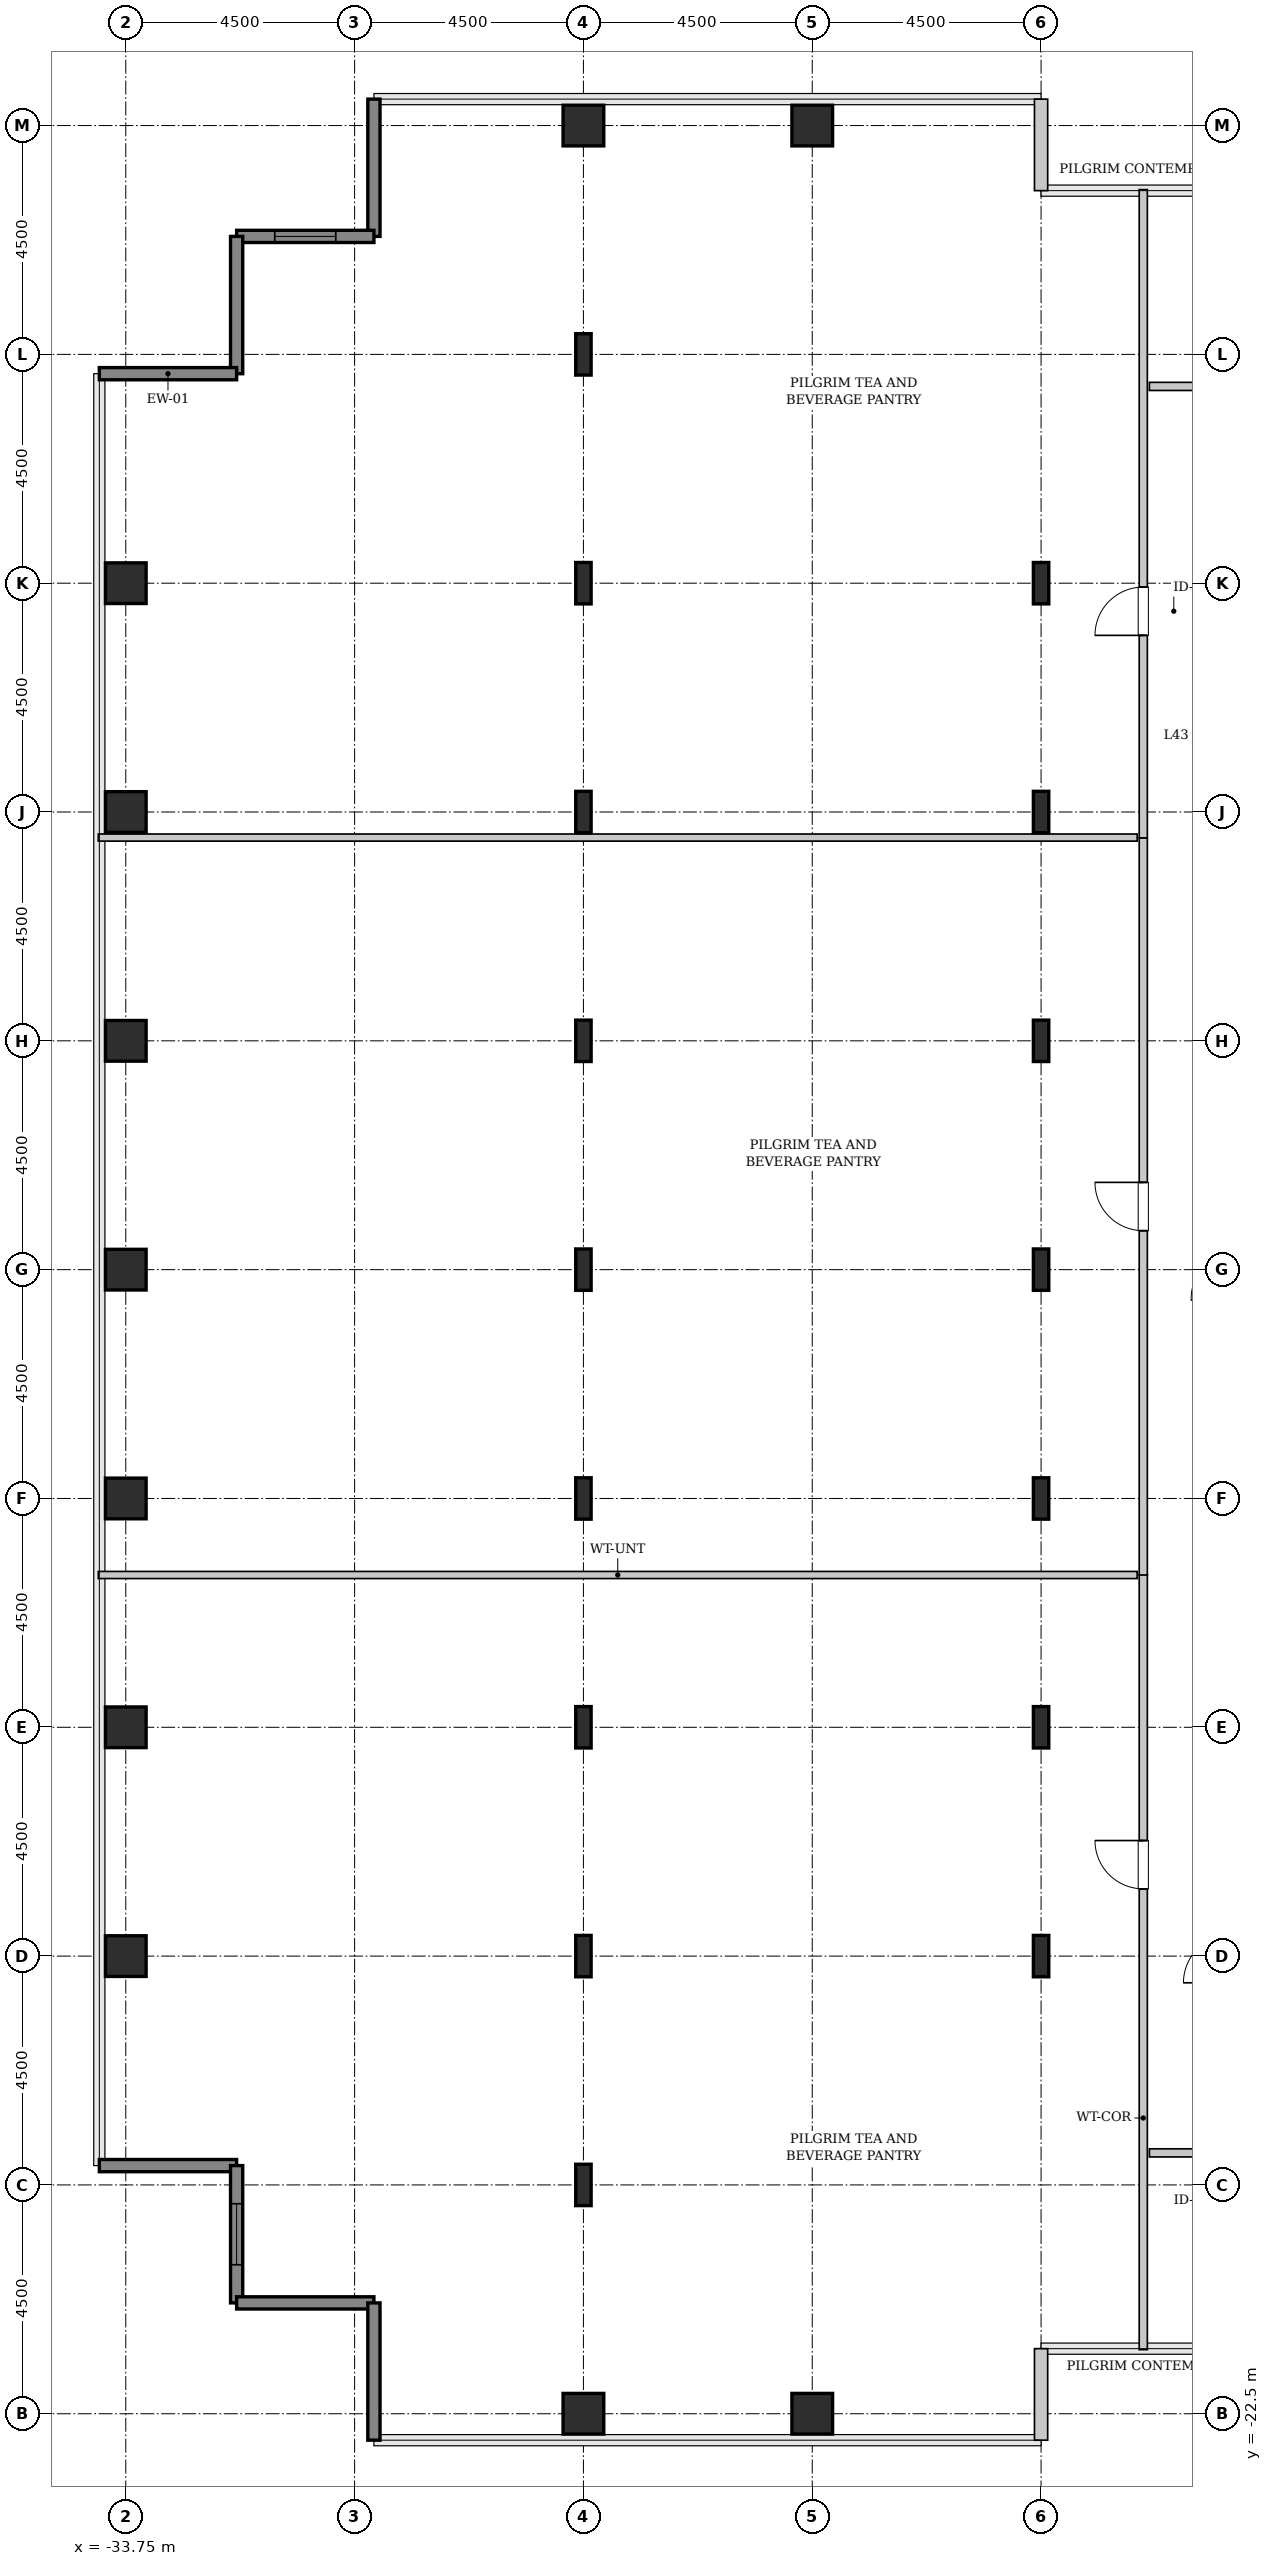
"""IFC4 building model, lengths in metres.
Left out: names, types, materials, properties, quantities, classifications, styles, units other than length and angle.
Written with IfcOpenShell. Run it as: python <this file> out.ifc"""

import sys

from ifc_helpers import new_model, si_unit, direction, frame, frame_2d, origin, origin_2d, place, context, subcontext, project, spatial, rectangle, hollow_rectangle, i_section, extrude, source, transform, mapped, element, fill, save


model = new_model("IFC4")
c1 = context("Model", 3, precision=1e-05, world=origin(), true_north=direction((0.0, 1.0)))
c2 = subcontext(c1, "Body", "Model", "MODEL_VIEW")
j1 = project(units=[si_unit("LENGTHUNIT", "METRE"), si_unit("PLANEANGLEUNIT", "RADIAN")], contexts=[c1])
p1 = place(None, origin())
s1 = spatial("IfcSite", under=j1, at=p1, CompositionType="ELEMENT")
p2 = place(p1, origin())
s2 = spatial("IfcBuilding", under=s1, at=p2, CompositionType="ELEMENT")
p3 = place(p2, frame((0.0, 0.0, 175.4)))
s3 = spatial("IfcBuildingStorey", under=s2, at=p3, CompositionType="ELEMENT", Elevation=175.4)
m1 = source(origin(), c2, "Body", "SweptSolid", [
    extrude(hollow_rectangle(XDim=0.8, YDim=0.8, WallThickness=0.04, InnerFilletRadius=0.04, OuterFilletRadius=0.08, at=origin_2d()), origin(), (0.0, 0.0, 1.0), 3.8),
])
for number, where, z_axis, x_axis in (
    (1, (-33.75, -13.5, 0.0), (0.0, 0.0, 1.0), (1.0, 0.0, 0.0)),
    (2, (-33.75, -9.0, 0.0), (0.0, 0.0, 1.0), (1.0, 0.0, 0.0)),
    (3, (-33.75, -4.5, 0.0), (0.0, 0.0, 1.0), (1.0, 0.0, 0.0)),
    (4, (-33.75, 0.0, 0.0), (0.0, 0.0, 1.0), (1.0, 0.0, 0.0)),
    (5, (-33.75, 4.5, 0.0), (0.0, 0.0, 1.0), (1.0, 0.0, 0.0)),
    (6, (-33.75, 9.0, 0.0), (0.0, 0.0, 1.0), (1.0, 0.0, 0.0)),
    (7, (-33.75, 13.5, 0.0), (0.0, 0.0, 1.0), (1.0, 0.0, 0.0)),
    (8, (-24.75, -22.5, 0.0), (0.0, 0.0, 1.0), (1.0, 0.0, 0.0)),
):
    element("IfcColumn", number, at=place(p3, frame(where, z_axis=z_axis, x_axis=x_axis)), inside=s3, PredefinedType="COLUMN", context=c2, shape_type="MappedRepresentation", body=[
        mapped(m1, transform((0.0, 0.0, 0.0), x_axis=(1.0, 0.0, 0.0), y_axis=(0.0, 1.0, 0.0), z_axis=(0.0, 0.0, 1.0), scale=1.0)),
    ])
m2 = source(origin(), c2, "Body", "SweptSolid", [
    extrude(i_section(OverallWidth=0.303, OverallDepth=0.814, WebThickness=0.021, FlangeThickness=0.04, FilletRadius=0.03, at=origin_2d()), origin(), (0.0, 0.0, 1.0), 3.8),
])
for number, where, z_axis, x_axis in (
    (9, (-24.75, -18.0, 0.0), (0.0, 0.0, 1.0), (1.0, 0.0, 0.0)),
    (10, (-24.75, -13.5, 0.0), (0.0, 0.0, 1.0), (1.0, 0.0, 0.0)),
    (11, (-24.75, -9.0, 0.0), (0.0, 0.0, 1.0), (1.0, 0.0, 0.0)),
    (12, (-24.75, -4.5, 0.0), (0.0, 0.0, 1.0), (1.0, 0.0, 0.0)),
    (13, (-24.75, 0.0, 0.0), (0.0, 0.0, 1.0), (1.0, 0.0, 0.0)),
    (14, (-24.75, 4.5, 0.0), (0.0, 0.0, 1.0), (1.0, 0.0, 0.0)),
    (15, (-24.75, 9.0, 0.0), (0.0, 0.0, 1.0), (1.0, 0.0, 0.0)),
    (16, (-24.75, 13.5, 0.0), (0.0, 0.0, 1.0), (1.0, 0.0, 0.0)),
    (17, (-24.75, 18.0, 0.0), (0.0, 0.0, 1.0), (1.0, 0.0, 0.0)),
):
    element("IfcColumn", number, at=place(p3, frame(where, z_axis=z_axis, x_axis=x_axis)), inside=s3, PredefinedType="COLUMN", context=c2, shape_type="MappedRepresentation", body=[
        mapped(m2, transform((0.0, 0.0, 0.0), x_axis=(1.0, 0.0, 0.0), y_axis=(0.0, 1.0, 0.0), z_axis=(0.0, 0.0, 1.0), scale=1.0)),
    ])
for number, where, z_axis, x_axis in (
    (18, (-24.75, 22.5, 0.0), (0.0, 0.0, 1.0), (1.0, 0.0, 0.0)),
    (19, (-20.25, -22.5, 0.0), (0.0, 0.0, 1.0), (1.0, 0.0, 0.0)),
    (20, (-20.25, 22.5, 0.0), (0.0, 0.0, 1.0), (1.0, 0.0, 0.0)),
):
    element("IfcColumn", number, at=place(p3, frame(where, z_axis=z_axis, x_axis=x_axis)), inside=s3, PredefinedType="COLUMN", context=c2, shape_type="MappedRepresentation", body=[
        mapped(m1, transform((0.0, 0.0, 0.0), x_axis=(1.0, 0.0, 0.0), y_axis=(0.0, 1.0, 0.0), z_axis=(0.0, 0.0, 1.0), scale=1.0)),
    ])
for number, where, z_axis, x_axis in (
    (21, (-15.75, -13.5, 0.0), (0.0, 0.0, 1.0), (1.0, 0.0, 0.0)),
    (22, (-15.75, -9.0, 0.0), (0.0, 0.0, 1.0), (1.0, 0.0, 0.0)),
    (23, (-15.75, -4.5, 0.0), (0.0, 0.0, 1.0), (1.0, 0.0, 0.0)),
    (24, (-15.75, 0.0, 0.0), (0.0, 0.0, 1.0), (1.0, 0.0, 0.0)),
    (25, (-15.75, 4.5, 0.0), (0.0, 0.0, 1.0), (1.0, 0.0, 0.0)),
    (26, (-15.75, 9.0, 0.0), (0.0, 0.0, 1.0), (1.0, 0.0, 0.0)),
    (27, (-15.75, 13.5, 0.0), (0.0, 0.0, 1.0), (1.0, 0.0, 0.0)),
):
    element("IfcColumn", number, at=place(p3, frame(where, z_axis=z_axis, x_axis=x_axis)), inside=s3, PredefinedType="COLUMN", context=c2, shape_type="MappedRepresentation", body=[
        mapped(m2, transform((0.0, 0.0, 0.0), x_axis=(1.0, 0.0, 0.0), y_axis=(0.0, 1.0, 0.0), z_axis=(0.0, 0.0, 1.0), scale=1.0)),
    ])
m3 = source(origin(), c2, "Body", "SweptSolid", [
    extrude(rectangle(XDim=1.8, YDim=0.26, at=frame_2d((0.9, 0.0))), origin(), (0.0, 0.0, 1.0), 3.55),
])
p4 = place(p3, frame((-15.75, 21.22, 0.0), z_axis=(0.0, 0.0, 1.0), x_axis=(0.0, 1.0, 0.0)))
e28 = element("IfcWall", 28, at=p4, inside=s3, PredefinedType="SOLIDWALL", context=c2, shape_type="MappedRepresentation", body=[
    mapped(m3, transform((0.0, 0.0, 0.0), x_axis=(1.0, 0.0, 0.0), y_axis=(0.0, 1.0, 0.0), z_axis=(0.0, 0.0, 1.0), scale=1.0)),
])
m4 = source(origin(), c2, "Body", "SweptSolid", [
    extrude(rectangle(XDim=2.7, YDim=0.24, at=frame_2d((1.35, 0.0))), origin(), (0.0, 0.0, 1.0), 3.55),
])
p5 = place(p3, frame((-28.87, 23.02, 0.0), z_axis=(0.0, 0.0, 1.0), x_axis=(0.0, -1.0, 0.0)))
e29 = element("IfcWall", 29, at=p5, inside=s3, PredefinedType="SHEAR", context=c2, shape_type="MappedRepresentation", body=[
    mapped(m4, transform((0.0, 0.0, 0.0), x_axis=(1.0, 0.0, 0.0), y_axis=(0.0, 1.0, 0.0), z_axis=(0.0, 0.0, 1.0), scale=1.0)),
])
p6 = place(p3, frame((-28.87, 20.32, 0.0), z_axis=(0.0, 0.0, 1.0), x_axis=(-1.0, 0.0, 0.0)))
e30 = element("IfcWall", 30, at=p6, inside=s3, PredefinedType="SHEAR", context=c2, shape_type="MappedRepresentation", body=[
    mapped(m4, transform((0.0, 0.0, 0.0), x_axis=(1.0, 0.0, 0.0), y_axis=(0.0, 1.0, 0.0), z_axis=(0.0, 0.0, 1.0), scale=1.0)),
])
p7 = place(p6, frame((0.75, 0.0, 0.85)))
e31 = element("IfcOpeningElement", 31, at=p7, cuts=e30, PredefinedType="OPENING", context=c2, shape_type="SweptSolid", body=[
    extrude(rectangle(XDim=1.2, YDim=1.8, at=frame_2d((0.6, 0.9))), frame((0.0, 0.13, 0.0), z_axis=(0.0, -1.0, 0.0), x_axis=(1.0, 0.0, 0.0)), (0.0, 0.0, 1.0), 0.26),
])
for number, where, z_axis, x_axis in (
    (32, (-31.57, 20.32, 0.0), (0.0, 0.0, 1.0), (0.0, -1.0, 0.0)),
    (33, (-31.57, 17.62, 0.0), (0.0, 0.0, 1.0), (-1.0, 0.0, 0.0)),
    (34, (-34.27, -17.62, 0.0), (0.0, 0.0, 1.0), (1.0, 0.0, 0.0)),
):
    element("IfcWall", number, at=place(p3, frame(where, z_axis=z_axis, x_axis=x_axis)), inside=s3, PredefinedType="SHEAR", context=c2, shape_type="MappedRepresentation", body=[
        mapped(m4, transform((0.0, 0.0, 0.0), x_axis=(1.0, 0.0, 0.0), y_axis=(0.0, 1.0, 0.0), z_axis=(0.0, 0.0, 1.0), scale=1.0)),
    ])
p8 = place(p3, frame((-31.57, -17.62, 0.0), z_axis=(0.0, 0.0, 1.0), x_axis=(0.0, -1.0, 0.0)))
e35 = element("IfcWall", 35, at=p8, inside=s3, PredefinedType="SHEAR", context=c2, shape_type="MappedRepresentation", body=[
    mapped(m4, transform((0.0, 0.0, 0.0), x_axis=(1.0, 0.0, 0.0), y_axis=(0.0, 1.0, 0.0), z_axis=(0.0, 0.0, 1.0), scale=1.0)),
])
p9 = place(p8, frame((0.75, 0.0, 0.85)))
e36 = element("IfcOpeningElement", 36, at=p9, cuts=e35, PredefinedType="OPENING", context=c2, shape_type="SweptSolid", body=[
    extrude(rectangle(XDim=1.2, YDim=1.8, at=frame_2d((0.6, 0.9))), frame((0.0, 0.13, 0.0), z_axis=(0.0, -1.0, 0.0), x_axis=(1.0, 0.0, 0.0)), (0.0, 0.0, 1.0), 0.26),
])
for number, where, z_axis, x_axis in (
    (37, (-31.57, -20.32, 0.0), (0.0, 0.0, 1.0), (1.0, 0.0, 0.0)),
    (38, (-28.87, -20.32, 0.0), (0.0, 0.0, 1.0), (0.0, -1.0, 0.0)),
):
    element("IfcWall", number, at=place(p3, frame(where, z_axis=z_axis, x_axis=x_axis)), inside=s3, PredefinedType="SHEAR", context=c2, shape_type="MappedRepresentation", body=[
        mapped(m4, transform((0.0, 0.0, 0.0), x_axis=(1.0, 0.0, 0.0), y_axis=(0.0, 1.0, 0.0), z_axis=(0.0, 0.0, 1.0), scale=1.0)),
    ])
p10 = place(p3, frame((-15.75, -23.02, 0.0), z_axis=(0.0, 0.0, 1.0), x_axis=(0.0, 1.0, 0.0)))
e39 = element("IfcWall", 39, at=p10, inside=s3, PredefinedType="SOLIDWALL", context=c2, shape_type="MappedRepresentation", body=[
    mapped(m3, transform((0.0, 0.0, 0.0), x_axis=(1.0, 0.0, 0.0), y_axis=(0.0, 1.0, 0.0), z_axis=(0.0, 0.0, 1.0), scale=1.0)),
])
m5 = source(origin(), c2, "Body", "SweptSolid", [
    extrude(rectangle(XDim=15.245, YDim=0.16, at=frame_2d((7.623, 0.0))), origin(), (0.0, 0.0, 1.0), 3.535),
])
p11 = place(p3, frame((-13.74, -21.24, 0.0), z_axis=(0.0, 0.0, 1.0), x_axis=(0.0, 1.0, 0.0)))
e40 = element("IfcWall", 40, at=p11, inside=s3, PredefinedType="PARTITIONING", context=c2, shape_type="MappedRepresentation", body=[
    mapped(m5, transform((0.0, 0.0, 0.0), x_axis=(1.0, 0.0, 0.0), y_axis=(0.0, 1.0, 0.0), z_axis=(0.0, 0.0, 1.0), scale=1.0)),
])
p12 = place(p11, frame((9.062, 0.0, 0.0)))
e41 = element("IfcOpeningElement", 41, at=p12, cuts=e40, PredefinedType="OPENING", context=c2, shape_type="SweptSolid", body=[
    extrude(rectangle(XDim=0.95, YDim=2.1, at=frame_2d((0.475, 1.05))), frame((0.0, 0.09, 0.0), z_axis=(0.0, -1.0, 0.0), x_axis=(1.0, 0.0, 0.0)), (0.0, 0.0, 1.0), 0.18),
])
m6 = source(origin(), c2, "Body", "SweptSolid", [
    extrude(rectangle(XDim=20.43, YDim=0.14, at=frame_2d((10.215, 0.0))), origin(), (0.0, 0.0, 1.0), 3.535),
])
p13 = place(p3, frame((-34.29, -6.005, 0.0), z_axis=(0.0, 0.0, 1.0), x_axis=(1.0, 0.0, 0.0)))
e42 = element("IfcWall", 42, at=p13, inside=s3, PredefinedType="PARTITIONING", context=c2, shape_type="MappedRepresentation", body=[
    mapped(m6, transform((0.0, 0.0, 0.0), x_axis=(1.0, 0.0, 0.0), y_axis=(0.0, 1.0, 0.0), z_axis=(0.0, 0.0, 1.0), scale=1.0)),
])
m7 = source(origin(), c2, "Body", "SweptSolid", [
    extrude(rectangle(XDim=12.752, YDim=0.16, at=frame_2d((6.376, 0.0))), origin(), (0.0, 0.0, 1.0), 3.535),
])
p14 = place(p3, frame((-13.74, 8.488, 0.0), z_axis=(0.0, 0.0, 1.0), x_axis=(0.0, 1.0, 0.0)))
e43 = element("IfcWall", 43, at=p14, inside=s3, PredefinedType="PARTITIONING", context=c2, shape_type="MappedRepresentation", body=[
    mapped(m7, transform((0.0, 0.0, 0.0), x_axis=(1.0, 0.0, 0.0), y_axis=(0.0, 1.0, 0.0), z_axis=(0.0, 0.0, 1.0), scale=1.0)),
])
p15 = place(p14, frame((3.986, 0.0, 0.0)))
e44 = element("IfcOpeningElement", 44, at=p15, cuts=e43, PredefinedType="OPENING", context=c2, shape_type="SweptSolid", body=[
    extrude(rectangle(XDim=0.95, YDim=2.1, at=frame_2d((0.475, 1.05))), frame((0.0, 0.09, 0.0), z_axis=(0.0, -1.0, 0.0), x_axis=(1.0, 0.0, 0.0)), (0.0, 0.0, 1.0), 0.18),
])
m8 = source(origin(), c2, "Body", "SweptSolid", [
    extrude(rectangle(XDim=20.43, YDim=0.14, at=frame_2d((10.215, 0.0))), origin(), (0.0, 0.0, 1.0), 2.875),
])
p16 = place(p3, frame((-34.29, 8.498, 0.0), z_axis=(0.0, 0.0, 1.0), x_axis=(1.0, 0.0, 0.0)))
e45 = element("IfcWall", 45, at=p16, inside=s3, PredefinedType="PARTITIONING", context=c2, shape_type="MappedRepresentation", body=[
    mapped(m8, transform((0.0, 0.0, 0.0), x_axis=(1.0, 0.0, 0.0), y_axis=(0.0, 1.0, 0.0), z_axis=(0.0, 0.0, 1.0), scale=1.0)),
])
m9 = source(origin(), c2, "Body", "SweptSolid", [
    extrude(rectangle(XDim=14.492, YDim=0.16, at=frame_2d((7.246, 0.0))), origin(), (0.0, 0.0, 1.0), 3.535),
])
p17 = place(p3, frame((-13.74, -6.005, 0.0), z_axis=(0.0, 0.0, 1.0), x_axis=(0.0, 1.0, 0.0)))
e46 = element("IfcWall", 46, at=p17, inside=s3, PredefinedType="PARTITIONING", context=c2, shape_type="MappedRepresentation", body=[
    mapped(m9, transform((0.0, 0.0, 0.0), x_axis=(1.0, 0.0, 0.0), y_axis=(0.0, 1.0, 0.0), z_axis=(0.0, 0.0, 1.0), scale=1.0)),
])
p18 = place(p17, frame((6.771, 0.0, 0.0)))
e47 = element("IfcOpeningElement", 47, at=p18, cuts=e46, PredefinedType="OPENING", context=c2, shape_type="SweptSolid", body=[
    extrude(rectangle(XDim=0.95, YDim=2.1, at=frame_2d((0.475, 1.05))), frame((0.0, 0.09, 0.0), z_axis=(0.0, -1.0, 0.0), x_axis=(1.0, 0.0, 0.0)), (0.0, 0.0, 1.0), 0.18),
])
m10 = source(origin(), c2, "Body", "SweptSolid", [
    extrude(rectangle(XDim=4.16, YDim=0.16, at=frame_2d((2.08, 0.0))), origin(), (0.0, 0.0, 1.0), 3.535),
])
p19 = place(p3, frame((-13.62, 17.37, 0.0), z_axis=(0.0, 0.0, 1.0), x_axis=(1.0, 0.0, 0.0)))
e48 = element("IfcWall", 48, at=p19, inside=s3, PredefinedType="PARTITIONING", context=c2, shape_type="MappedRepresentation", body=[
    mapped(m10, transform((0.0, 0.0, 0.0), x_axis=(1.0, 0.0, 0.0), y_axis=(0.0, 1.0, 0.0), z_axis=(0.0, 0.0, 1.0), scale=1.0)),
])
p20 = place(p19, frame((0.969, 0.0, 0.0)))
e49 = element("IfcOpeningElement", 49, at=p20, cuts=e48, PredefinedType="OPENING", context=c2, shape_type="SweptSolid", body=[
    extrude(rectangle(XDim=0.95, YDim=2.1, at=frame_2d((0.475, 1.05))), frame((0.0, 0.09, 0.0), z_axis=(0.0, -1.0, 0.0), x_axis=(1.0, 0.0, 0.0)), (0.0, 0.0, 1.0), 0.18),
])
m11 = source(origin(), c2, "Body", "SweptSolid", [
    extrude(rectangle(XDim=3.825, YDim=0.16, at=frame_2d((1.913, 0.0))), origin(), (0.0, 0.0, 1.0), 3.535),
])
p21 = place(p3, frame((-13.62, -17.37, 0.0), z_axis=(0.0, 0.0, 1.0), x_axis=(1.0, 0.0, 0.0)))
e50 = element("IfcWall", 50, at=p21, inside=s3, PredefinedType="PARTITIONING", context=c2, shape_type="MappedRepresentation", body=[
    mapped(m11, transform((0.0, 0.0, 0.0), x_axis=(1.0, 0.0, 0.0), y_axis=(0.0, 1.0, 0.0), z_axis=(0.0, 0.0, 1.0), scale=1.0)),
])
p22 = place(p21, frame((1.067, 0.0, 0.0)))
e51 = element("IfcOpeningElement", 51, at=p22, cuts=e50, PredefinedType="OPENING", context=c2, shape_type="SweptSolid", body=[
    extrude(rectangle(XDim=0.95, YDim=2.1, at=frame_2d((0.475, 1.05))), frame((0.0, 0.09, 0.0), z_axis=(0.0, -1.0, 0.0), x_axis=(1.0, 0.0, 0.0)), (0.0, 0.0, 1.0), 0.18),
])
m12 = source(origin(), c2, "Body", "SweptSolid", [
    extrude(rectangle(XDim=1.2, YDim=1.8, at=frame_2d((0.6, 0.9))), frame((0.0, 0.03, 0.0), z_axis=(0.0, -1.0, 0.0), x_axis=(1.0, 0.0, 0.0)), (0.0, 0.0, 1.0), 0.06),
])
p23 = place(p7, origin())
e52 = element("IfcWindow", 52, at=p23, inside=s3, PartitioningType="SINGLE_PANEL", PredefinedType="WINDOW", context=c2, shape_type="MappedRepresentation", body=[
    mapped(m12, transform((0.0, 0.0, 0.0), x_axis=(1.0, 0.0, 0.0), y_axis=(0.0, 1.0, 0.0), z_axis=(0.0, 0.0, 1.0), scale=1.0)),
])
fill(e31, e52)
p24 = place(p9, origin())
e53 = element("IfcWindow", 53, at=p24, inside=s3, PartitioningType="SINGLE_PANEL", PredefinedType="WINDOW", context=c2, shape_type="MappedRepresentation", body=[
    mapped(m12, transform((0.0, 0.0, 0.0), x_axis=(1.0, 0.0, 0.0), y_axis=(0.0, 1.0, 0.0), z_axis=(0.0, 0.0, 1.0), scale=1.0)),
])
fill(e36, e53)
m13 = source(origin(), c2, "Body", "SweptSolid", [
    extrude(rectangle(XDim=0.95, YDim=2.1, at=frame_2d((0.475, 1.05))), frame((0.0, 0.025, 0.0), z_axis=(0.0, -1.0, 0.0), x_axis=(1.0, 0.0, 0.0)), (0.0, 0.0, 1.0), 0.05),
])
p25 = place(p12, origin())
e54 = element("IfcDoor", 54, at=p25, inside=s3, OperationType="SINGLE_SWING_RIGHT", PredefinedType="DOOR", context=c2, shape_type="MappedRepresentation", body=[
    mapped(m13, transform((0.0, 0.0, 0.0), x_axis=(1.0, 0.0, 0.0), y_axis=(0.0, 1.0, 0.0), z_axis=(0.0, 0.0, 1.0), scale=1.0)),
])
fill(e41, e54)
p26 = place(p15, origin())
e55 = element("IfcDoor", 55, at=p26, inside=s3, OperationType="SINGLE_SWING_LEFT", PredefinedType="DOOR", context=c2, shape_type="MappedRepresentation", body=[
    mapped(m13, transform((0.0, 0.0, 0.0), x_axis=(1.0, 0.0, 0.0), y_axis=(0.0, 1.0, 0.0), z_axis=(0.0, 0.0, 1.0), scale=1.0)),
])
fill(e44, e55)
p27 = place(p18, origin())
e56 = element("IfcDoor", 56, at=p27, inside=s3, OperationType="SINGLE_SWING_RIGHT", PredefinedType="DOOR", context=c2, shape_type="MappedRepresentation", body=[
    mapped(m13, transform((0.0, 0.0, 0.0), x_axis=(1.0, 0.0, 0.0), y_axis=(0.0, 1.0, 0.0), z_axis=(0.0, 0.0, 1.0), scale=1.0)),
])
fill(e47, e56)
save(model, sys.argv[1])
